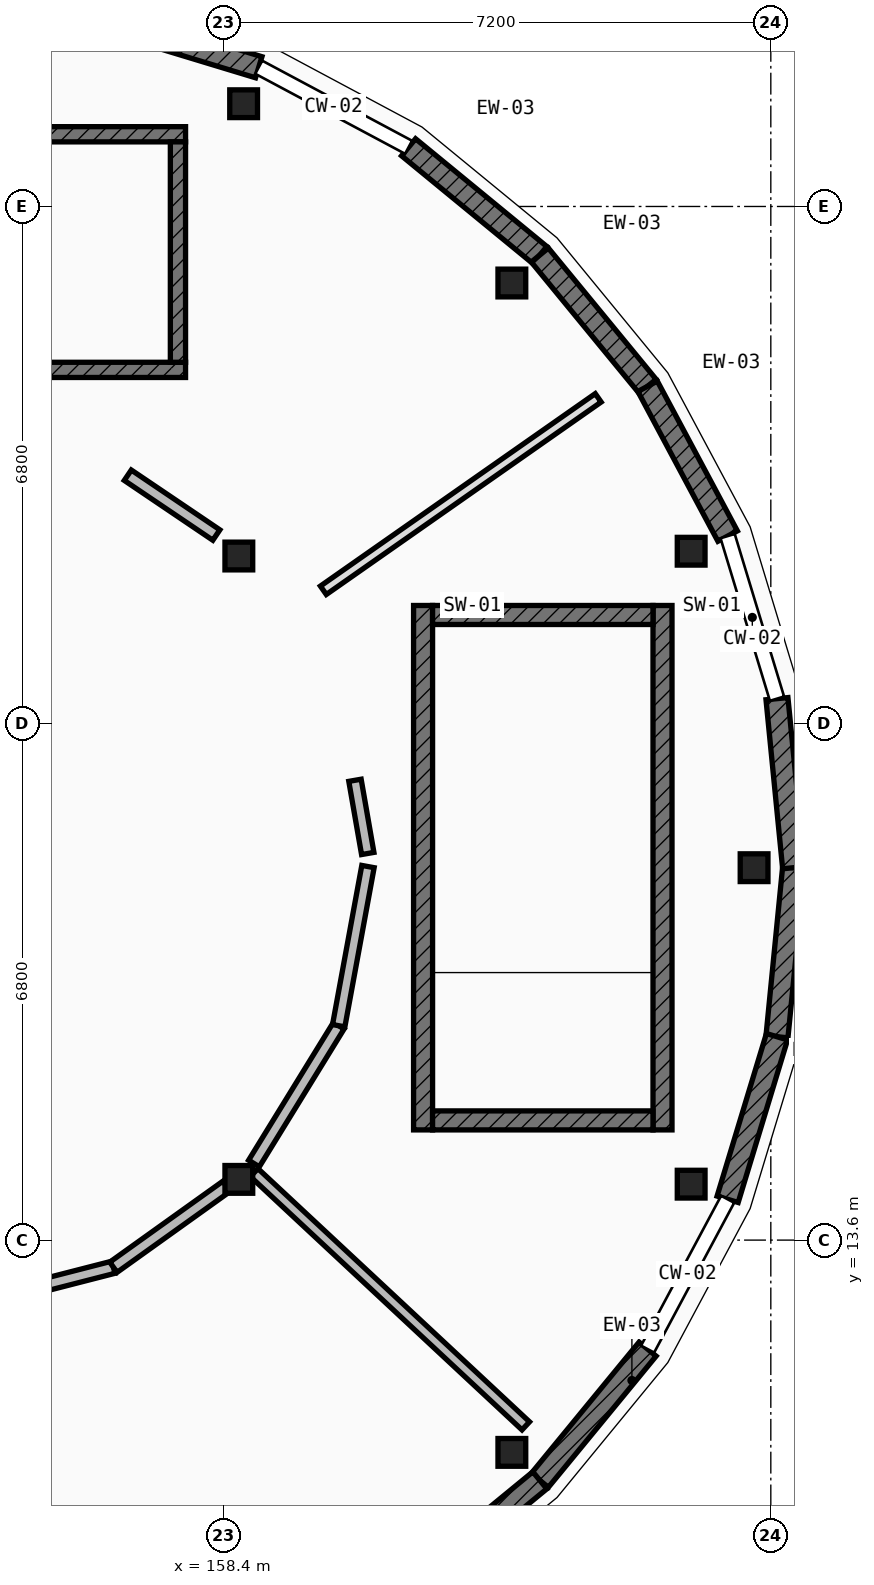
"""IFC4 building model, lengths in metres.
Left out: names, types, materials, properties, quantities, classifications, styles, units other than length and angle.
Written with IfcOpenShell. Run it as: python <this file> out.ifc"""

import sys

from ifc_helpers import new_model, si_unit, direction, frame, frame_2d, origin, origin_2d, place, context, subcontext, project, spatial, rectangle, extrude, element, fill, save


model = new_model("IFC4")
c1 = context("Model", 3, precision=1e-05, world=origin(), true_north=direction((0.0, 1.0)))
c2 = subcontext(c1, "Body", "Model", "MODEL_VIEW")
j1 = project(units=[si_unit("LENGTHUNIT", "METRE"), si_unit("PLANEANGLEUNIT", "RADIAN")], contexts=[c1])
p1 = place(None, origin())
s1 = spatial("IfcSite", under=j1, at=p1, CompositionType="ELEMENT")
p2 = place(p1, origin())
s2 = spatial("IfcBuilding", under=s1, at=p2, CompositionType="ELEMENT")
p3 = place(p2, frame((0.0, 0.0, 4.55)))
s3 = spatial("IfcBuildingStorey", under=s2, at=p3, CompositionType="ELEMENT", Elevation=4.55)
for number, where, z_axis, x_axis in (
    (1, (165.38, 18.5, 0.0), (0.0, 0.0, 1.0), (1.0, 0.0, 0.0)),
    (2, (164.552, 22.664, 0.0), (0.0, 0.0, 1.0), (1.0, 0.0, 0.0)),
    (3, (162.193, 26.193, 0.0), (0.0, 0.0, 1.0), (1.0, 0.0, 0.0)),
    (4, (158.664, 28.552, 0.0), (0.0, 0.0, 1.0), (1.0, 0.0, 0.0)),
    (5, (162.193, 10.807, 0.0), (0.0, 0.0, 1.0), (1.0, 0.0, 0.0)),
    (6, (164.552, 14.336, 0.0), (0.0, 0.0, 1.0), (1.0, 0.0, 0.0)),
    (7, (158.601, 22.601, 0.0), (0.0, 0.0, 1.0), (1.0, 0.0, 0.0)),
    (8, (158.601, 14.399, 0.0), (0.0, 0.0, 1.0), (1.0, 0.0, 0.0)),
):
    element("IfcColumn", number, at=place(p3, frame(where, z_axis=z_axis, x_axis=x_axis)), inside=s3, PredefinedType="COLUMN", context=c2, shape_type="SweptSolid", body=[
        extrude(rectangle(XDim=0.365, YDim=0.365, at=origin_2d()), origin(), (0.0, 0.0, 1.0), 4.2),
    ])
p4 = place(p3, frame((165.9, 18.5, 0.0), z_axis=(0.0, 0.0, 1.0), x_axis=(-0.097989369151, -0.995187461503, 0.0)))
e9 = element("IfcWall", 9, at=p4, inside=s3, PredefinedType="ELEMENTEDWALL", context=c2, shape_type="SweptSolid", body=[
    extrude(rectangle(XDim=2.235, YDim=0.29, at=frame_2d((1.117, 0.0))), origin(), (0.0, 0.0, 1.0), 3.309),
])
p5 = place(p3, frame((165.681, 16.276, 0.0), z_axis=(0.0, 0.0, 1.0), x_axis=(-0.290322655883, -0.956928814218, 0.0)))
e10 = element("IfcWall", 10, at=p5, inside=s3, PredefinedType="ELEMENTEDWALL", context=c2, shape_type="SweptSolid", body=[
    extrude(rectangle(XDim=2.235, YDim=0.29, at=frame_2d((1.118, 0.0))), origin(), (0.0, 0.0, 1.0), 3.309),
])
p6 = place(p5, frame((0.393, 0.0, 0.85)))
e11 = element("IfcOpeningElement", 11, at=p6, cuts=e10, PredefinedType="OPENING", context=c2, shape_type="SweptSolid", body=[
    extrude(rectangle(XDim=1.45, YDim=2.05, at=frame_2d((0.725, 1.025))), frame((0.0, 0.155, 0.0), z_axis=(0.0, -1.0, 0.0), x_axis=(1.0, 0.0, 0.0)), (0.0, 0.0, 1.0), 0.31),
])
p7 = place(p3, frame((163.979, 12.166, 0.0), z_axis=(0.0, 0.0, 1.0), x_axis=(-0.63455767339, -0.772875513354, 0.0)))
e12 = element("IfcWall", 12, at=p7, inside=s3, PredefinedType="ELEMENTEDWALL", context=c2, shape_type="SweptSolid", body=[
    extrude(rectangle(XDim=2.235, YDim=0.29, at=frame_2d((1.117, 0.0))), origin(), (0.0, 0.0, 1.0), 3.309),
])
p8 = place(p7, frame((0.367, 0.0, 0.85)))
e13 = element("IfcOpeningElement", 13, at=p8, cuts=e12, PredefinedType="OPENING", context=c2, shape_type="SweptSolid", body=[
    extrude(rectangle(XDim=1.5, YDim=1.3, at=frame_2d((0.75, 0.65))), frame((0.0, 0.155, 0.0), z_axis=(0.0, -1.0, 0.0), x_axis=(1.0, 0.0, 0.0)), (0.0, 0.0, 1.0), 0.31),
])
p9 = place(p3, frame((162.561, 10.439, 0.0), z_axis=(0.0, 0.0, 1.0), x_axis=(-0.772875513354, -0.63455767339, 0.0)))
e14 = element("IfcWall", 14, at=p9, inside=s3, PredefinedType="ELEMENTEDWALL", context=c2, shape_type="SweptSolid", body=[
    extrude(rectangle(XDim=2.235, YDim=0.29, at=frame_2d((1.117, 0.0))), origin(), (0.0, 0.0, 1.0), 3.309),
])
p10 = place(p9, frame((0.367, 0.0, 0.85)))
e15 = element("IfcOpeningElement", 15, at=p10, cuts=e14, PredefinedType="OPENING", context=c2, shape_type="SweptSolid", body=[
    extrude(rectangle(XDim=1.5, YDim=1.65, at=frame_2d((0.75, 0.825))), frame((0.0, 0.155, 0.0), z_axis=(0.0, -1.0, 0.0), x_axis=(1.0, 0.0, 0.0)), (0.0, 0.0, 1.0), 0.31),
])
p11 = place(p3, frame((156.724, 29.681, 0.0), z_axis=(0.0, 0.0, 1.0), x_axis=(0.956928814218, -0.290322655883, 0.0)))
e16 = element("IfcWall", 16, at=p11, inside=s3, PredefinedType="ELEMENTEDWALL", context=c2, shape_type="SweptSolid", body=[
    extrude(rectangle(XDim=2.235, YDim=0.29, at=frame_2d((1.118, 0.0))), origin(), (0.0, 0.0, 1.0), 3.309),
])
p12 = place(p11, frame((0.643, 0.0, 0.85)))
e17 = element("IfcOpeningElement", 17, at=p12, cuts=e16, PredefinedType="OPENING", context=c2, shape_type="SweptSolid", body=[
    extrude(rectangle(XDim=0.95, YDim=1.35, at=frame_2d((0.475, 0.675))), frame((0.0, 0.155, 0.0), z_axis=(0.0, -1.0, 0.0), x_axis=(1.0, 0.0, 0.0)), (0.0, 0.0, 1.0), 0.31),
])
p13 = place(p3, frame((160.834, 27.979, 0.0), z_axis=(0.0, 0.0, 1.0), x_axis=(0.772875513354, -0.63455767339, 0.0)))
e18 = element("IfcWall", 18, at=p13, inside=s3, PredefinedType="ELEMENTEDWALL", context=c2, shape_type="SweptSolid", body=[
    extrude(rectangle(XDim=2.235, YDim=0.29, at=frame_2d((1.117, 0.0))), origin(), (0.0, 0.0, 1.0), 3.309),
])
p14 = place(p13, frame((0.642, 0.0, 0.85)))
e19 = element("IfcOpeningElement", 19, at=p14, cuts=e18, PredefinedType="OPENING", context=c2, shape_type="SweptSolid", body=[
    extrude(rectangle(XDim=0.95, YDim=1.6, at=frame_2d((0.475, 0.8))), frame((0.0, 0.155, 0.0), z_axis=(0.0, -1.0, 0.0), x_axis=(1.0, 0.0, 0.0)), (0.0, 0.0, 1.0), 0.31),
])
p15 = place(p3, frame((162.561, 26.561, 0.0), z_axis=(0.0, 0.0, 1.0), x_axis=(0.63455767339, -0.772875513354, 0.0)))
e20 = element("IfcWall", 20, at=p15, inside=s3, PredefinedType="ELEMENTEDWALL", context=c2, shape_type="SweptSolid", body=[
    extrude(rectangle(XDim=2.235, YDim=0.29, at=frame_2d((1.117, 0.0))), origin(), (0.0, 0.0, 1.0), 3.309),
])
p16 = place(p15, frame((0.642, 0.0, 0.85)))
e21 = element("IfcOpeningElement", 21, at=p16, cuts=e20, PredefinedType="OPENING", context=c2, shape_type="SweptSolid", body=[
    extrude(rectangle(XDim=0.95, YDim=1.8, at=frame_2d((0.475, 0.9))), frame((0.0, 0.155, 0.0), z_axis=(0.0, -1.0, 0.0), x_axis=(1.0, 0.0, 0.0)), (0.0, 0.0, 1.0), 0.31),
])
p17 = place(p3, frame((163.979, 24.834, 0.0), z_axis=(0.0, 0.0, 1.0), x_axis=(0.471217561446, -0.882017012185, 0.0)))
e22 = element("IfcWall", 22, at=p17, inside=s3, PredefinedType="ELEMENTEDWALL", context=c2, shape_type="SweptSolid", body=[
    extrude(rectangle(XDim=2.235, YDim=0.29, at=frame_2d((1.117, 0.0))), origin(), (0.0, 0.0, 1.0), 3.309),
])
p18 = place(p17, frame((0.642, 0.0, 0.85)))
e23 = element("IfcOpeningElement", 23, at=p18, cuts=e22, PredefinedType="OPENING", context=c2, shape_type="SweptSolid", body=[
    extrude(rectangle(XDim=0.95, YDim=2.05, at=frame_2d((0.475, 1.025))), frame((0.0, 0.155, 0.0), z_axis=(0.0, -1.0, 0.0), x_axis=(1.0, 0.0, 0.0)), (0.0, 0.0, 1.0), 0.31),
])
p19 = place(p3, frame((165.681, 20.724, 0.0), z_axis=(0.0, 0.0, 1.0), x_axis=(0.097989369151, -0.995187461503, 0.0)))
e24 = element("IfcWall", 24, at=p19, inside=s3, PredefinedType="ELEMENTEDWALL", context=c2, shape_type="SweptSolid", body=[
    extrude(rectangle(XDim=2.235, YDim=0.29, at=frame_2d((1.117, 0.0))), origin(), (0.0, 0.0, 1.0), 3.309),
])
p20 = place(p3, frame((161.025, 21.95, 0.0), z_axis=(0.0, 0.0, 1.0), x_axis=(0.0, -1.0, 0.0)))
e25 = element("IfcWall", 25, at=p20, inside=s3, PredefinedType="SHEAR", context=c2, shape_type="SweptSolid", body=[
    extrude(rectangle(XDim=6.9, YDim=0.25, at=frame_2d((3.45, 0.0))), origin(), (0.0, 0.0, 1.0), 3.955),
])
p21 = place(p20, frame((0.43, 0.0, 0.0)))
e26 = element("IfcOpeningElement", 26, at=p21, cuts=e25, PredefinedType="OPENING", context=c2, shape_type="SweptSolid", body=[
    extrude(rectangle(XDim=1.1, YDim=2.15, at=frame_2d((0.55, 1.075))), frame((0.0, 0.135, 0.0), z_axis=(0.0, -1.0, 0.0), x_axis=(1.0, 0.0, 0.0)), (0.0, 0.0, 1.0), 0.27),
])
p22 = place(p3, frame((164.175, 21.95, 0.0), z_axis=(0.0, 0.0, 1.0), x_axis=(0.0, -1.0, 0.0)))
e27 = element("IfcWall", 27, at=p22, inside=s3, PredefinedType="SHEAR", context=c2, shape_type="SweptSolid", body=[
    extrude(rectangle(XDim=6.9, YDim=0.25, at=frame_2d((3.45, 0.0))), origin(), (0.0, 0.0, 1.0), 3.955),
])
for number, where, z_axis, x_axis in (
    (28, (161.15, 21.825, 0.0), (0.0, 0.0, 1.0), (1.0, 0.0, 0.0)),
    (29, (161.15, 15.175, 0.0), (0.0, 0.0, 1.0), (1.0, 0.0, 0.0)),
):
    element("IfcWall", number, at=place(p3, frame(where, z_axis=z_axis, x_axis=x_axis)), inside=s3, PredefinedType="SHEAR", context=c2, shape_type="SweptSolid", body=[
        extrude(rectangle(XDim=2.9, YDim=0.25, at=frame_2d((1.45, 0.0))), origin(), (0.0, 0.0, 1.0), 3.955),
    ])
p23 = place(p3, frame((151.1, 25.05, 0.0), z_axis=(0.0, 0.0, 1.0), x_axis=(1.0, 0.0, 0.0)))
e30 = element("IfcWall", 30, at=p23, inside=s3, PredefinedType="SHEAR", context=c2, shape_type="SweptSolid", body=[
    extrude(rectangle(XDim=6.8, YDim=0.2, at=frame_2d((3.4, 0.0))), origin(), (0.0, 0.0, 1.0), 3.955),
])
p24 = place(p23, frame((0.38, 0.0, 0.0)))
e31 = element("IfcOpeningElement", 31, at=p24, cuts=e30, PredefinedType="OPENING", context=c2, shape_type="SweptSolid", body=[
    extrude(rectangle(XDim=1.05, YDim=2.15, at=frame_2d((0.525, 1.075))), frame((0.0, 0.11, 0.0), z_axis=(0.0, -1.0, 0.0), x_axis=(1.0, 0.0, 0.0)), (0.0, 0.0, 1.0), 0.22),
])
p25 = place(p3, frame((151.1, 28.15, 0.0), z_axis=(0.0, 0.0, 1.0), x_axis=(1.0, 0.0, 0.0)))
e32 = element("IfcWall", 32, at=p25, inside=s3, PredefinedType="SHEAR", context=c2, shape_type="SweptSolid", body=[
    extrude(rectangle(XDim=6.8, YDim=0.2, at=frame_2d((3.4, 0.0))), origin(), (0.0, 0.0, 1.0), 3.955),
])
p26 = place(p3, frame((157.8, 25.15, 0.0), z_axis=(0.0, 0.0, 1.0), x_axis=(0.0, 1.0, 0.0)))
e33 = element("IfcWall", 33, at=p26, inside=s3, PredefinedType="SHEAR", context=c2, shape_type="SweptSolid", body=[
    extrude(rectangle(XDim=2.9, YDim=0.2, at=frame_2d((1.45, 0.0))), origin(), (0.0, 0.0, 1.0), 3.955),
])
p27 = place(p3, frame((158.803, 14.488, 0.0), z_axis=(0.0, 0.0, 1.0), x_axis=(0.731337706655, -0.682015512158, 0.0)))
e34 = element("IfcWall", 34, at=p27, inside=s3, PredefinedType="PARTITIONING", context=c2, shape_type="SweptSolid", body=[
    extrude(rectangle(XDim=4.885, YDim=0.145, at=frame_2d((2.443, 0.0))), origin(), (0.0, 0.0, 1.0), 3.284),
])
p28 = place(p3, frame((159.713, 22.15, 0.0), z_axis=(0.0, 0.0, 1.0), x_axis=(0.819164362173, 0.573558844187, 0.0)))
e35 = element("IfcWall", 35, at=p28, inside=s3, PredefinedType="PLUMBINGWALL", context=c2, shape_type="SweptSolid", body=[
    extrude(rectangle(XDim=4.415, YDim=0.135, at=frame_2d((2.207, 0.0))), origin(), (0.0, 0.0, 1.0), 3.284),
])
p29 = place(p3, frame((154.889, 12.713, 0.0), z_axis=(0.0, 0.0, 1.0), x_axis=(0.968515845244, 0.248951918071, 0.0)))
e36 = element("IfcWall", 36, at=p29, inside=s3, PredefinedType="PARTITIONING", context=c2, shape_type="SweptSolid", body=[
    extrude(rectangle(XDim=2.129, YDim=0.165, at=frame_2d((1.064, 0.0))), origin(), (0.0, 0.0, 1.0), 3.284),
])
p30 = place(p29, frame((0.444, 0.0, 0.0)))
e37 = element("IfcOpeningElement", 37, at=p30, cuts=e36, PredefinedType="OPENING", context=c2, shape_type="SweptSolid", body=[
    extrude(rectangle(XDim=1.24, YDim=2.22, at=frame_2d((0.62, 1.11))), frame((0.0, 0.093, 0.0), z_axis=(0.0, -1.0, 0.0), x_axis=(1.0, 0.0, 0.0)), (0.0, 0.0, 1.0), 0.185),
])
p31 = place(p3, frame((156.951, 13.243, 0.0), z_axis=(0.0, 0.0, 1.0), x_axis=(0.813273111974, 0.581882157606, 0.0)))
e38 = element("IfcWall", 38, at=p31, inside=s3, PredefinedType="PARTITIONING", context=c2, shape_type="SweptSolid", body=[
    extrude(rectangle(XDim=1.828, YDim=0.165, at=frame_2d((0.914, 0.0))), origin(), (0.0, 0.0, 1.0), 3.284),
])
p32 = place(p3, frame((158.8, 14.608, 0.0), z_axis=(0.0, 0.0, 1.0), x_axis=(0.523860609665, 0.851804004241, 0.0)))
e39 = element("IfcWall", 39, at=p32, inside=s3, PredefinedType="PARTITIONING", context=c2, shape_type="SweptSolid", body=[
    extrude(rectangle(XDim=2.128, YDim=0.165, at=frame_2d((1.064, 0.0))), origin(), (0.0, 0.0, 1.0), 3.284),
])
p33 = place(p32, frame((0.424, 0.0, 0.0)))
e40 = element("IfcOpeningElement", 40, at=p33, cuts=e39, PredefinedType="OPENING", context=c2, shape_type="SweptSolid", body=[
    extrude(rectangle(XDim=1.28, YDim=2.3, at=frame_2d((0.64, 1.15))), frame((0.0, 0.093, 0.0), z_axis=(0.0, -1.0, 0.0), x_axis=(1.0, 0.0, 0.0)), (0.0, 0.0, 1.0), 0.185),
])
p34 = place(p3, frame((159.915, 16.421, 0.0), z_axis=(0.0, 0.0, 1.0), x_axis=(0.180832621822, 0.983513885456, 0.0)))
e41 = element("IfcWall", 41, at=p34, inside=s3, PredefinedType="PARTITIONING", context=c2, shape_type="SweptSolid", body=[
    extrude(rectangle(XDim=2.129, YDim=0.165, at=frame_2d((1.064, 0.0))), origin(), (0.0, 0.0, 1.0), 3.284),
])
p35 = place(p3, frame((160.297, 18.687, 0.0), z_axis=(0.0, 0.0, 1.0), x_axis=(-0.172089509946, 0.985081316728, 0.0)))
e42 = element("IfcWall", 42, at=p35, inside=s3, PredefinedType="PARTITIONING", context=c2, shape_type="SweptSolid", body=[
    extrude(rectangle(XDim=0.978, YDim=0.165, at=frame_2d((0.489, 0.0))), origin(), (0.0, 0.0, 1.0), 3.284),
])
p36 = place(p3, frame((158.305, 22.877, 0.0), z_axis=(0.0, 0.0, 1.0), x_axis=(-0.82861509232, 0.559818746362, 0.0)))
e43 = element("IfcWall", 43, at=p36, inside=s3, PredefinedType="PARTITIONING", context=c2, shape_type="SweptSolid", body=[
    extrude(rectangle(XDim=1.406, YDim=0.165, at=frame_2d((0.703, 0.0))), origin(), (0.0, 0.0, 1.0), 3.284),
])
p37 = place(p36, frame((0.233, 0.0, 0.0)))
e44 = element("IfcOpeningElement", 44, at=p37, cuts=e43, PredefinedType="OPENING", context=c2, shape_type="SweptSolid", body=[
    extrude(rectangle(XDim=0.94, YDim=2.1, at=frame_2d((0.47, 1.05))), frame((0.0, 0.093, 0.0), z_axis=(0.0, -1.0, 0.0), x_axis=(1.0, 0.0, 0.0)), (0.0, 0.0, 1.0), 0.185),
])
p38 = place(p6, origin())
e45 = element("IfcWindow", 45, at=p38, inside=s3, PartitioningType="SINGLE_PANEL", PredefinedType="WINDOW", context=c2, shape_type="SweptSolid", body=[
    extrude(rectangle(XDim=1.45, YDim=2.05, at=frame_2d((0.725, 1.025))), frame((0.0, 0.03, 0.0), z_axis=(0.0, -1.0, 0.0), x_axis=(1.0, 0.0, 0.0)), (0.0, 0.0, 1.0), 0.06),
])
fill(e11, e45)
p39 = place(p8, origin())
e46 = element("IfcWindow", 46, at=p39, inside=s3, PartitioningType="SINGLE_PANEL", PredefinedType="WINDOW", context=c2, shape_type="SweptSolid", body=[
    extrude(rectangle(XDim=1.5, YDim=1.3, at=frame_2d((0.75, 0.65))), frame((0.0, 0.03, 0.0), z_axis=(0.0, -1.0, 0.0), x_axis=(1.0, 0.0, 0.0)), (0.0, 0.0, 1.0), 0.06),
])
fill(e13, e46)
p40 = place(p10, origin())
e47 = element("IfcWindow", 47, at=p40, inside=s3, PartitioningType="SINGLE_PANEL", PredefinedType="WINDOW", context=c2, shape_type="SweptSolid", body=[
    extrude(rectangle(XDim=1.5, YDim=1.65, at=frame_2d((0.75, 0.825))), frame((0.0, 0.03, 0.0), z_axis=(0.0, -1.0, 0.0), x_axis=(1.0, 0.0, 0.0)), (0.0, 0.0, 1.0), 0.06),
])
fill(e15, e47)
p41 = place(p12, origin())
e48 = element("IfcWindow", 48, at=p41, inside=s3, PartitioningType="SINGLE_PANEL", PredefinedType="WINDOW", context=c2, shape_type="SweptSolid", body=[
    extrude(rectangle(XDim=0.95, YDim=1.35, at=frame_2d((0.475, 0.675))), frame((0.0, 0.03, 0.0), z_axis=(0.0, -1.0, 0.0), x_axis=(1.0, 0.0, 0.0)), (0.0, 0.0, 1.0), 0.06),
])
fill(e17, e48)
p42 = place(p14, origin())
e49 = element("IfcWindow", 49, at=p42, inside=s3, PartitioningType="SINGLE_PANEL", PredefinedType="WINDOW", context=c2, shape_type="SweptSolid", body=[
    extrude(rectangle(XDim=0.95, YDim=1.6, at=frame_2d((0.475, 0.8))), frame((0.0, 0.03, 0.0), z_axis=(0.0, -1.0, 0.0), x_axis=(1.0, 0.0, 0.0)), (0.0, 0.0, 1.0), 0.06),
])
fill(e19, e49)
p43 = place(p16, origin())
e50 = element("IfcWindow", 50, at=p43, inside=s3, PartitioningType="SINGLE_PANEL", PredefinedType="WINDOW", context=c2, shape_type="SweptSolid", body=[
    extrude(rectangle(XDim=0.95, YDim=1.8, at=frame_2d((0.475, 0.9))), frame((0.0, 0.03, 0.0), z_axis=(0.0, -1.0, 0.0), x_axis=(1.0, 0.0, 0.0)), (0.0, 0.0, 1.0), 0.06),
])
fill(e21, e50)
p44 = place(p18, origin())
e51 = element("IfcWindow", 51, at=p44, inside=s3, PartitioningType="SINGLE_PANEL", PredefinedType="WINDOW", context=c2, shape_type="SweptSolid", body=[
    extrude(rectangle(XDim=0.95, YDim=2.05, at=frame_2d((0.475, 1.025))), frame((0.0, 0.03, 0.0), z_axis=(0.0, -1.0, 0.0), x_axis=(1.0, 0.0, 0.0)), (0.0, 0.0, 1.0), 0.06),
])
fill(e23, e51)
p45 = place(p21, origin())
e52 = element("IfcDoor", 52, at=p45, inside=s3, OperationType="SINGLE_SWING_LEFT", PredefinedType="DOOR", context=c2, shape_type="SweptSolid", body=[
    extrude(rectangle(XDim=1.1, YDim=2.15, at=frame_2d((0.55, 1.075))), frame((0.0, 0.025, 0.0), z_axis=(0.0, -1.0, 0.0), x_axis=(1.0, 0.0, 0.0)), (0.0, 0.0, 1.0), 0.05),
])
fill(e26, e52)
p46 = place(p30, origin())
e53 = element("IfcDoor", 53, at=p46, inside=s3, OperationType="SINGLE_SWING_LEFT", PredefinedType="DOOR", context=c2, shape_type="SweptSolid", body=[
    extrude(rectangle(XDim=1.24, YDim=2.22, at=frame_2d((0.62, 1.11))), frame((0.0, 0.025, 0.0), z_axis=(0.0, -1.0, 0.0), x_axis=(1.0, 0.0, 0.0)), (0.0, 0.0, 1.0), 0.05),
])
fill(e37, e53)
p47 = place(p33, origin())
e54 = element("IfcDoor", 54, at=p47, inside=s3, OperationType="SINGLE_SWING_RIGHT", PredefinedType="DOOR", context=c2, shape_type="SweptSolid", body=[
    extrude(rectangle(XDim=1.28, YDim=2.3, at=frame_2d((0.64, 1.15))), frame((0.0, 0.025, 0.0), z_axis=(0.0, -1.0, 0.0), x_axis=(1.0, 0.0, 0.0)), (0.0, 0.0, 1.0), 0.05),
])
fill(e40, e54)
p48 = place(p37, origin())
e55 = element("IfcDoor", 55, at=p48, inside=s3, OperationType="SINGLE_SWING_LEFT", PredefinedType="DOOR", context=c2, shape_type="SweptSolid", body=[
    extrude(rectangle(XDim=0.94, YDim=2.1, at=frame_2d((0.47, 1.05))), frame((0.0, 0.025, 0.0), z_axis=(0.0, -1.0, 0.0), x_axis=(1.0, 0.0, 0.0)), (0.0, 0.0, 1.0), 0.05),
])
fill(e44, e55)
save(model, sys.argv[1])
